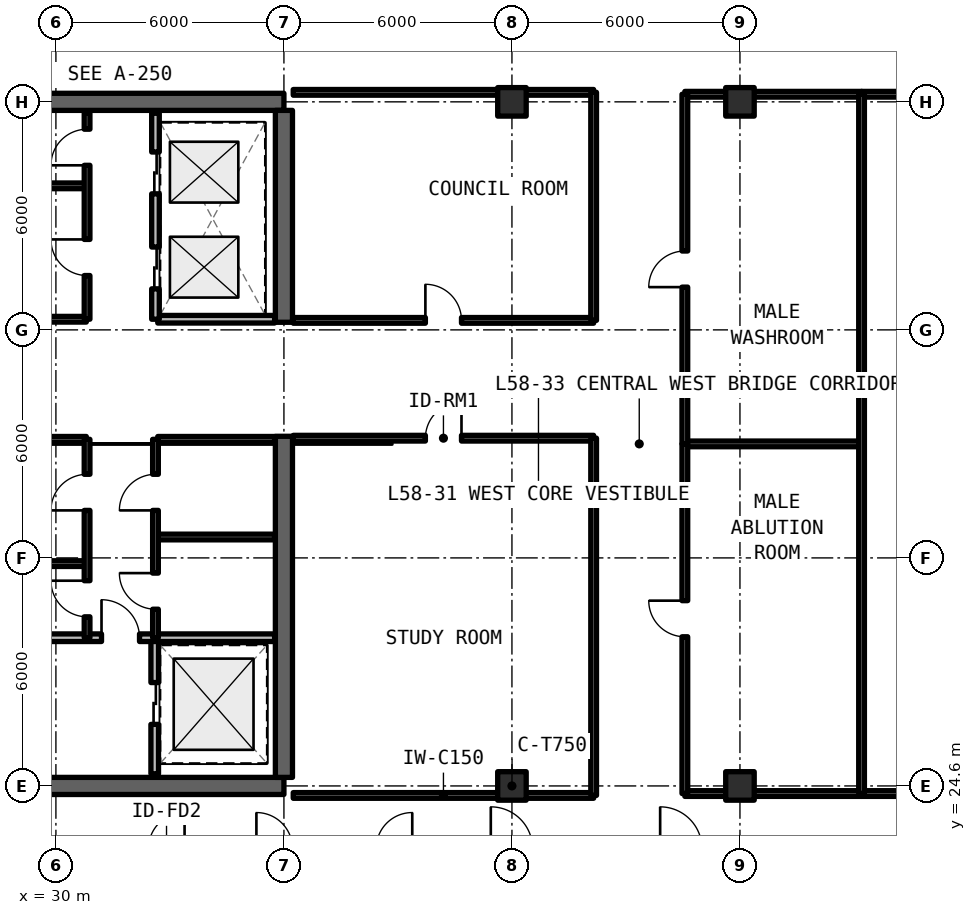
"""IFC4 building model, lengths in metres.
Left out: names, types, materials, properties, quantities, classifications, styles, units other than length and angle.
Written with IfcOpenShell. Run it as: python <this file> out.ifc"""

import sys

from ifc_helpers import new_model, si_unit, direction, frame, frame_2d, origin, origin_2d, place, context, subcontext, project, spatial, rectangle, extrude, element, fill, save


model = new_model("IFC4")
c1 = context("Model", 3, precision=1e-05, world=origin(), true_north=direction((0.0, 1.0)))
c2 = subcontext(c1, "Body", "Model", "MODEL_VIEW")
j1 = project(units=[si_unit("LENGTHUNIT", "METRE"), si_unit("PLANEANGLEUNIT", "RADIAN")], contexts=[c1])
p1 = place(None, origin())
s1 = spatial("IfcSite", under=j1, at=p1, CompositionType="ELEMENT")
p2 = place(p1, origin())
s2 = spatial("IfcBuilding", under=s1, at=p2, CompositionType="ELEMENT")
p3 = place(p2, frame((0.0, 0.0, 208.23)))
s3 = spatial("IfcBuildingStorey", under=s2, at=p3, CompositionType="ELEMENT", Elevation=208.23)
for number, where, z_axis, x_axis in (
    (1, (24.0, 24.6, 0.0), (0.0, 0.0, 1.0), (1.0, 0.0, 0.0)),
    (2, (36.0, 42.6, 0.0), (0.0, 0.0, 1.0), (-1.0, 0.0, 0.0)),
):
    element("IfcWall", number, at=place(p3, frame(where, z_axis=z_axis, x_axis=x_axis)), inside=s3, PredefinedType="SHEAR", context=c2, shape_type="SweptSolid", body=[
        extrude(rectangle(XDim=12.0, YDim=0.45, at=frame_2d((6.0, 0.0))), origin(), (0.0, 0.0, 1.0), 3.63),
    ])
p4 = place(p3, frame((36.0, 24.825, 0.0), z_axis=(0.0, 0.0, 1.0), x_axis=(0.0, 1.0, 0.0)))
e3 = element("IfcWall", 3, at=p4, inside=s3, PredefinedType="SHEAR", context=c2, shape_type="SweptSolid", body=[
    extrude(rectangle(XDim=8.975, YDim=0.45, at=frame_2d((4.488, 0.0))), origin(), (0.0, 0.0, 1.0), 3.63),
])
p5 = place(p3, frame((36.0, 36.8, 0.0), z_axis=(0.0, 0.0, 1.0), x_axis=(0.0, 1.0, 0.0)))
e4 = element("IfcWall", 4, at=p5, inside=s3, PredefinedType="SHEAR", context=c2, shape_type="SweptSolid", body=[
    extrude(rectangle(XDim=5.575, YDim=0.45, at=frame_2d((2.788, 0.0))), origin(), (0.0, 0.0, 1.0), 3.63),
])
for number, where, z_axis, x_axis in (
    (5, (42.0, 24.6, 0.0), (0.0, 0.0, 1.0), (1.0, 0.0, 0.0)),
    (6, (42.0, 42.6, 0.0), (0.0, 0.0, 1.0), (1.0, 0.0, 0.0)),
    (7, (48.0, 24.6, 0.0), (0.0, 0.0, 1.0), (1.0, 0.0, 0.0)),
    (8, (48.0, 42.6, 0.0), (0.0, 0.0, 1.0), (1.0, 0.0, 0.0)),
):
    element("IfcColumn", number, at=place(p3, frame(where, z_axis=z_axis, x_axis=x_axis)), inside=s3, PredefinedType="COLUMN", context=c2, shape_type="SweptSolid", body=[
        extrude(rectangle(XDim=0.75, YDim=0.75, at=origin_2d()), origin(), (0.0, 0.0, 1.0), 3.63),
    ])
p6 = place(p3, frame((32.6, 24.92, 0.0), z_axis=(0.0, 0.0, 1.0), x_axis=(0.0, 1.0, 0.0)))
e9 = element("IfcWall", 9, at=p6, inside=s3, PredefinedType="SOLIDWALL", context=c2, shape_type="SweptSolid", body=[
    extrude(rectangle(XDim=3.58, YDim=0.2, at=frame_2d((1.79, 0.0))), origin(), (0.0, 0.0, 1.0), 2.63),
])
p7 = place(p6, frame((1.3, 0.0, 0.0)))
e10 = element("IfcOpeningElement", 10, at=p7, cuts=e9, PredefinedType="OPENING", context=c2, shape_type="SweptSolid", body=[
    extrude(rectangle(XDim=1.1, YDim=2.2, at=frame_2d((0.55, 1.1))), frame((0.0, 0.11, 0.0), z_axis=(0.0, -1.0, 0.0), x_axis=(1.0, 0.0, 0.0)), (0.0, 0.0, 1.0), 0.22),
])
p8 = place(p3, frame((28.17, 28.5, 0.0), z_axis=(0.0, 0.0, 1.0), x_axis=(1.0, 0.0, 0.0)))
e11 = element("IfcWall", 11, at=p8, inside=s3, PredefinedType="SOLIDWALL", context=c2, shape_type="SweptSolid", body=[
    extrude(rectangle(XDim=7.585, YDim=0.2, at=frame_2d((3.792, 0.0))), origin(), (0.0, 0.0, 1.0), 2.63),
])
p9 = place(p8, frame((3.03, 0.0, 0.0)))
e12 = element("IfcOpeningElement", 12, at=p9, cuts=e11, PredefinedType="OPENING", context=c2, shape_type="SweptSolid", body=[
    extrude(rectangle(XDim=1.0, YDim=2.15, at=frame_2d((0.5, 1.075))), frame((0.0, 0.11, 0.0), z_axis=(0.0, -1.0, 0.0), x_axis=(1.0, 0.0, 0.0)), (0.0, 0.0, 1.0), 0.22),
])
for number, where, z_axis, x_axis in (
    (13, (28.17, 30.45, 0.0), (0.0, 0.0, 1.0), (1.0, 0.0, 0.0)),
    (14, (28.17, 33.72, 0.0), (0.0, 0.0, 1.0), (1.0, 0.0, 0.0)),
):
    element("IfcWall", number, at=place(p3, frame(where, z_axis=z_axis, x_axis=x_axis)), inside=s3, PredefinedType="SOLIDWALL", context=c2, shape_type="SweptSolid", body=[
        extrude(rectangle(XDim=2.63, YDim=0.15, at=frame_2d((1.315, 0.0))), origin(), (0.0, 0.0, 1.0), 2.63),
    ])
p10 = place(p3, frame((30.82, 28.5, 0.0), z_axis=(0.0, 0.0, 1.0), x_axis=(0.0, 1.0, 0.0)))
e15 = element("IfcWall", 15, at=p10, inside=s3, PredefinedType="SOLIDWALL", context=c2, shape_type="SweptSolid", body=[
    extrude(rectangle(XDim=5.22, YDim=0.15, at=frame_2d((2.61, 0.0))), origin(), (0.0, 0.0, 1.0), 2.63),
])
p11 = place(p10, frame((0.55, 0.0, 0.0)))
e16 = element("IfcOpeningElement", 16, at=p11, cuts=e15, PredefinedType="OPENING", context=c2, shape_type="SweptSolid", body=[
    extrude(rectangle(XDim=0.95, YDim=2.15, at=frame_2d((0.475, 1.075))), frame((0.0, 0.085, 0.0), z_axis=(0.0, -1.0, 0.0), x_axis=(1.0, 0.0, 0.0)), (0.0, 0.0, 1.0), 0.17),
])
p12 = place(p10, frame((3.35, 0.0, 0.0)))
e17 = element("IfcOpeningElement", 17, at=p12, cuts=e15, PredefinedType="OPENING", context=c2, shape_type="SweptSolid", body=[
    extrude(rectangle(XDim=0.95, YDim=2.15, at=frame_2d((0.475, 1.075))), frame((0.0, 0.085, 0.0), z_axis=(0.0, -1.0, 0.0), x_axis=(1.0, 0.0, 0.0)), (0.0, 0.0, 1.0), 0.17),
])
for number, where, z_axis, x_axis in (
    (18, (32.68, 31.15, 0.0), (0.0, 0.0, 1.0), (1.0, 0.0, 0.0)),
    (19, (32.68, 33.72, 0.0), (0.0, 0.0, 1.0), (1.0, 0.0, 0.0)),
):
    element("IfcWall", number, at=place(p3, frame(where, z_axis=z_axis, x_axis=x_axis)), inside=s3, PredefinedType="SOLIDWALL", context=c2, shape_type="SweptSolid", body=[
        extrude(rectangle(XDim=3.075, YDim=0.15, at=frame_2d((1.538, 0.0))), origin(), (0.0, 0.0, 1.0), 2.63),
    ])
p13 = place(p3, frame((32.62, 28.5, 0.0), z_axis=(0.0, 0.0, 1.0), x_axis=(0.0, 1.0, 0.0)))
e20 = element("IfcWall", 20, at=p13, inside=s3, PredefinedType="SOLIDWALL", context=c2, shape_type="SweptSolid", body=[
    extrude(rectangle(XDim=5.22, YDim=0.15, at=frame_2d((2.61, 0.0))), origin(), (0.0, 0.0, 1.0), 2.63),
])
p14 = place(p13, frame((0.75, 0.0, 0.0)))
e21 = element("IfcOpeningElement", 21, at=p14, cuts=e20, PredefinedType="OPENING", context=c2, shape_type="SweptSolid", body=[
    extrude(rectangle(XDim=0.95, YDim=2.15, at=frame_2d((0.475, 1.075))), frame((0.0, 0.085, 0.0), z_axis=(0.0, -1.0, 0.0), x_axis=(1.0, 0.0, 0.0)), (0.0, 0.0, 1.0), 0.17),
])
p15 = place(p13, frame((3.35, 0.0, 0.0)))
e22 = element("IfcOpeningElement", 22, at=p15, cuts=e20, PredefinedType="OPENING", context=c2, shape_type="SweptSolid", body=[
    extrude(rectangle(XDim=0.95, YDim=2.15, at=frame_2d((0.475, 1.075))), frame((0.0, 0.085, 0.0), z_axis=(0.0, -1.0, 0.0), x_axis=(1.0, 0.0, 0.0)), (0.0, 0.0, 1.0), 0.17),
])
for number, where, z_axis, x_axis in (
    (23, (28.17, 36.88, 0.0), (0.0, 0.0, 1.0), (1.0, 0.0, 0.0)),
    (24, (28.17, 40.39, 0.0), (0.0, 0.0, 1.0), (1.0, 0.0, 0.0)),
):
    element("IfcWall", number, at=place(p3, frame(where, z_axis=z_axis, x_axis=x_axis)), inside=s3, PredefinedType="SOLIDWALL", context=c2, shape_type="SweptSolid", body=[
        extrude(rectangle(XDim=2.63, YDim=0.15, at=frame_2d((1.315, 0.0))), origin(), (0.0, 0.0, 1.0), 2.63),
    ])
p16 = place(p3, frame((30.82, 36.88, 0.0), z_axis=(0.0, 0.0, 1.0), x_axis=(0.0, 1.0, 0.0)))
e25 = element("IfcWall", 25, at=p16, inside=s3, PredefinedType="SOLIDWALL", context=c2, shape_type="SweptSolid", body=[
    extrude(rectangle(XDim=5.42, YDim=0.15, at=frame_2d((2.71, 0.0))), origin(), (0.0, 0.0, 1.0), 2.63),
])
p17 = place(p16, frame((1.15, 0.0, 0.0)))
e26 = element("IfcOpeningElement", 26, at=p17, cuts=e25, PredefinedType="OPENING", context=c2, shape_type="SweptSolid", body=[
    extrude(rectangle(XDim=0.95, YDim=2.15, at=frame_2d((0.475, 1.075))), frame((0.0, 0.085, 0.0), z_axis=(0.0, -1.0, 0.0), x_axis=(1.0, 0.0, 0.0)), (0.0, 0.0, 1.0), 0.17),
])
p18 = place(p16, frame((4.05, 0.0, 0.0)))
e27 = element("IfcOpeningElement", 27, at=p18, cuts=e25, PredefinedType="OPENING", context=c2, shape_type="SweptSolid", body=[
    extrude(rectangle(XDim=0.95, YDim=2.15, at=frame_2d((0.475, 1.075))), frame((0.0, 0.085, 0.0), z_axis=(0.0, -1.0, 0.0), x_axis=(1.0, 0.0, 0.0)), (0.0, 0.0, 1.0), 0.17),
])
p19 = place(p3, frame((32.68, 36.88, 0.0), z_axis=(0.0, 0.0, 1.0), x_axis=(1.0, 0.0, 0.0)))
e28 = element("IfcWall", 28, at=p19, inside=s3, PredefinedType="SOLIDWALL", context=c2, shape_type="SweptSolid", body=[
    extrude(rectangle(XDim=3.075, YDim=0.2, at=frame_2d((1.538, 0.0))), origin(), (0.0, 0.0, 1.0), 2.63),
])
p20 = place(p3, frame((32.62, 36.88, 0.0), z_axis=(0.0, 0.0, 1.0), x_axis=(0.0, 1.0, 0.0)))
e29 = element("IfcWall", 29, at=p20, inside=s3, PredefinedType="SOLIDWALL", context=c2, shape_type="SweptSolid", body=[
    extrude(rectangle(XDim=5.42, YDim=0.2, at=frame_2d((2.71, 0.0))), origin(), (0.0, 0.0, 1.0), 2.63),
])
p21 = place(p20, frame((0.8, 0.0, 0.0)))
e30 = element("IfcOpeningElement", 30, at=p21, cuts=e29, PredefinedType="OPENING", context=c2, shape_type="SweptSolid", body=[
    extrude(rectangle(XDim=1.1, YDim=2.2, at=frame_2d((0.55, 1.1))), frame((0.0, 0.11, 0.0), z_axis=(0.0, -1.0, 0.0), x_axis=(1.0, 0.0, 0.0)), (0.0, 0.0, 1.0), 0.22),
])
p22 = place(p20, frame((3.3, 0.0, 0.0)))
e31 = element("IfcOpeningElement", 31, at=p22, cuts=e29, PredefinedType="OPENING", context=c2, shape_type="SweptSolid", body=[
    extrude(rectangle(XDim=1.1, YDim=2.2, at=frame_2d((0.55, 1.1))), frame((0.0, 0.11, 0.0), z_axis=(0.0, -1.0, 0.0), x_axis=(1.0, 0.0, 0.0)), (0.0, 0.0, 1.0), 0.22),
])
p23 = place(p3, frame((36.245, 24.35, 0.0), z_axis=(0.0, 0.0, 1.0), x_axis=(1.0, 0.0, 0.0)))
e32 = element("IfcWall", 32, at=p23, inside=s3, PredefinedType="SOLIDWALL", context=c2, shape_type="SweptSolid", body=[
    extrude(rectangle(XDim=7.905, YDim=0.15, at=frame_2d((3.952, 0.0))), origin(), (0.0, 0.0, 1.0), 2.63),
])
p24 = place(p3, frame((36.245, 33.75, 0.0), z_axis=(0.0, 0.0, 1.0), x_axis=(1.0, 0.0, 0.0)))
e33 = element("IfcWall", 33, at=p24, inside=s3, PredefinedType="SOLIDWALL", context=c2, shape_type="SweptSolid", body=[
    extrude(rectangle(XDim=7.905, YDim=0.15, at=frame_2d((3.952, 0.0))), origin(), (0.0, 0.0, 1.0), 2.63),
])
p25 = place(p24, frame((3.478, 0.0, 0.0)))
e34 = element("IfcOpeningElement", 34, at=p25, cuts=e33, PredefinedType="OPENING", context=c2, shape_type="SweptSolid", body=[
    extrude(rectangle(XDim=0.95, YDim=2.15, at=frame_2d((0.475, 1.075))), frame((0.0, 0.085, 0.0), z_axis=(0.0, -1.0, 0.0), x_axis=(1.0, 0.0, 0.0)), (0.0, 0.0, 1.0), 0.17),
])
p26 = place(p3, frame((44.15, 24.35, 0.0), z_axis=(0.0, 0.0, 1.0), x_axis=(0.0, 1.0, 0.0)))
e35 = element("IfcWall", 35, at=p26, inside=s3, PredefinedType="SOLIDWALL", context=c2, shape_type="SweptSolid", body=[
    extrude(rectangle(XDim=9.4, YDim=0.15, at=frame_2d((4.7, 0.0))), origin(), (0.0, 0.0, 1.0), 2.63),
])
p27 = place(p3, frame((36.245, 36.85, 0.0), z_axis=(0.0, 0.0, 1.0), x_axis=(1.0, 0.0, 0.0)))
e36 = element("IfcWall", 36, at=p27, inside=s3, PredefinedType="SOLIDWALL", context=c2, shape_type="SweptSolid", body=[
    extrude(rectangle(XDim=7.905, YDim=0.15, at=frame_2d((3.952, 0.0))), origin(), (0.0, 0.0, 1.0), 2.63),
])
p28 = place(p27, frame((3.478, 0.0, 0.0)))
e37 = element("IfcOpeningElement", 37, at=p28, cuts=e36, PredefinedType="OPENING", context=c2, shape_type="SweptSolid", body=[
    extrude(rectangle(XDim=0.95, YDim=2.15, at=frame_2d((0.475, 1.075))), frame((0.0, 0.085, 0.0), z_axis=(0.0, -1.0, 0.0), x_axis=(1.0, 0.0, 0.0)), (0.0, 0.0, 1.0), 0.17),
])
p29 = place(p3, frame((36.245, 42.85, 0.0), z_axis=(0.0, 0.0, 1.0), x_axis=(1.0, 0.0, 0.0)))
e38 = element("IfcWall", 38, at=p29, inside=s3, PredefinedType="SOLIDWALL", context=c2, shape_type="SweptSolid", body=[
    extrude(rectangle(XDim=7.905, YDim=0.15, at=frame_2d((3.952, 0.0))), origin(), (0.0, 0.0, 1.0), 2.63),
])
p30 = place(p3, frame((44.15, 36.85, 0.0), z_axis=(0.0, 0.0, 1.0), x_axis=(0.0, 1.0, 0.0)))
e39 = element("IfcWall", 39, at=p30, inside=s3, PredefinedType="SOLIDWALL", context=c2, shape_type="SweptSolid", body=[
    extrude(rectangle(XDim=6.0, YDim=0.15, at=frame_2d((3.0, 0.0))), origin(), (0.0, 0.0, 1.0), 2.63),
])
for number, where, z_axis, x_axis in (
    (40, (46.55, 24.4, 0.0), (0.0, 0.0, 1.0), (1.0, 0.0, 0.0)),
    (41, (46.55, 33.6, 0.0), (0.0, 0.0, 1.0), (1.0, 0.0, 0.0)),
):
    element("IfcWall", number, at=place(p3, frame(where, z_axis=z_axis, x_axis=x_axis)), inside=s3, PredefinedType="SOLIDWALL", context=c2, shape_type="SweptSolid", body=[
        extrude(rectangle(XDim=4.65, YDim=0.15, at=frame_2d((2.325, 0.0))), origin(), (0.0, 0.0, 1.0), 2.63),
    ])
p31 = place(p3, frame((46.55, 24.4, 0.0), z_axis=(0.0, 0.0, 1.0), x_axis=(0.0, 1.0, 0.0)))
e42 = element("IfcWall", 42, at=p31, inside=s3, PredefinedType="SOLIDWALL", context=c2, shape_type="SweptSolid", body=[
    extrude(rectangle(XDim=9.2, YDim=0.15, at=frame_2d((4.6, 0.0))), origin(), (0.0, 0.0, 1.0), 2.63),
])
p32 = place(p31, frame((4.125, 0.0, 0.0)))
e43 = element("IfcOpeningElement", 43, at=p32, cuts=e42, PredefinedType="OPENING", context=c2, shape_type="SweptSolid", body=[
    extrude(rectangle(XDim=0.95, YDim=2.15, at=frame_2d((0.475, 1.075))), frame((0.0, 0.085, 0.0), z_axis=(0.0, -1.0, 0.0), x_axis=(1.0, 0.0, 0.0)), (0.0, 0.0, 1.0), 0.17),
])
p33 = place(p3, frame((46.55, 42.8, 0.0), z_axis=(0.0, 0.0, 1.0), x_axis=(1.0, 0.0, 0.0)))
e44 = element("IfcWall", 44, at=p33, inside=s3, PredefinedType="SOLIDWALL", context=c2, shape_type="SweptSolid", body=[
    extrude(rectangle(XDim=4.65, YDim=0.15, at=frame_2d((2.325, 0.0))), origin(), (0.0, 0.0, 1.0), 2.63),
])
p34 = place(p3, frame((46.55, 33.6, 0.0), z_axis=(0.0, 0.0, 1.0), x_axis=(0.0, 1.0, 0.0)))
e45 = element("IfcWall", 45, at=p34, inside=s3, PredefinedType="SOLIDWALL", context=c2, shape_type="SweptSolid", body=[
    extrude(rectangle(XDim=9.2, YDim=0.15, at=frame_2d((4.6, 0.0))), origin(), (0.0, 0.0, 1.0), 2.63),
])
p35 = place(p34, frame((4.125, 0.0, 0.0)))
e46 = element("IfcOpeningElement", 46, at=p35, cuts=e45, PredefinedType="OPENING", context=c2, shape_type="SweptSolid", body=[
    extrude(rectangle(XDim=0.95, YDim=2.15, at=frame_2d((0.475, 1.075))), frame((0.0, 0.085, 0.0), z_axis=(0.0, -1.0, 0.0), x_axis=(1.0, 0.0, 0.0)), (0.0, 0.0, 1.0), 0.17),
])
p36 = place(p3, frame((51.2, 24.4, 0.0), z_axis=(0.0, 0.0, 1.0), x_axis=(1.0, 0.0, 0.0)))
e47 = element("IfcWall", 47, at=p36, inside=s3, PredefinedType="SOLIDWALL", context=c2, shape_type="SweptSolid", body=[
    extrude(rectangle(XDim=11.6, YDim=0.15, at=frame_2d((5.8, 0.0))), origin(), (0.0, 0.0, 1.0), 2.63),
])
p37 = place(p36, frame((5.1, 0.0, 0.0)))
e48 = element("IfcOpeningElement", 48, at=p37, cuts=e47, PredefinedType="OPENING", context=c2, shape_type="SweptSolid", body=[
    extrude(rectangle(XDim=1.4, YDim=2.15, at=frame_2d((0.7, 1.075))), frame((0.0, 0.085, 0.0), z_axis=(0.0, -1.0, 0.0), x_axis=(1.0, 0.0, 0.0)), (0.0, 0.0, 1.0), 0.17),
])
p38 = place(p3, frame((51.2, 42.8, 0.0), z_axis=(0.0, 0.0, 1.0), x_axis=(1.0, 0.0, 0.0)))
e49 = element("IfcWall", 49, at=p38, inside=s3, PredefinedType="SOLIDWALL", context=c2, shape_type="SweptSolid", body=[
    extrude(rectangle(XDim=11.6, YDim=0.15, at=frame_2d((5.8, 0.0))), origin(), (0.0, 0.0, 1.0), 2.63),
])
p39 = place(p3, frame((51.2, 24.4, 0.0), z_axis=(0.0, 0.0, 1.0), x_axis=(0.0, 1.0, 0.0)))
e50 = element("IfcWall", 50, at=p39, inside=s3, PredefinedType="SOLIDWALL", context=c2, shape_type="SweptSolid", body=[
    extrude(rectangle(XDim=18.4, YDim=0.15, at=frame_2d((9.2, 0.0))), origin(), (0.0, 0.0, 1.0), 2.63),
])
p40 = place(p7, origin())
e51 = element("IfcDoor", 51, at=p40, inside=s3, OperationType="SLIDING_TO_LEFT", PredefinedType="DOOR", context=c2, shape_type="SweptSolid", body=[
    extrude(rectangle(XDim=1.1, YDim=2.2, at=frame_2d((0.55, 1.1))), frame((0.0, 0.025, 0.0), z_axis=(0.0, -1.0, 0.0), x_axis=(1.0, 0.0, 0.0)), (0.0, 0.0, 1.0), 0.05),
])
fill(e10, e51)
p41 = place(p9, origin())
e52 = element("IfcDoor", 52, at=p41, inside=s3, OperationType="SINGLE_SWING_LEFT", PredefinedType="DOOR", context=c2, shape_type="SweptSolid", body=[
    extrude(rectangle(XDim=1.0, YDim=2.15, at=frame_2d((0.5, 1.075))), frame((0.0, 0.025, 0.0), z_axis=(0.0, -1.0, 0.0), x_axis=(1.0, 0.0, 0.0)), (0.0, 0.0, 1.0), 0.05),
])
fill(e12, e52)
p42 = place(p11, origin())
e53 = element("IfcDoor", 53, at=p42, inside=s3, OperationType="SINGLE_SWING_RIGHT", PredefinedType="DOOR", context=c2, shape_type="SweptSolid", body=[
    extrude(rectangle(XDim=0.95, YDim=2.15, at=frame_2d((0.475, 1.075))), frame((0.0, 0.025, 0.0), z_axis=(0.0, -1.0, 0.0), x_axis=(1.0, 0.0, 0.0)), (0.0, 0.0, 1.0), 0.05),
])
fill(e16, e53)
p43 = place(p12, origin())
e54 = element("IfcDoor", 54, at=p43, inside=s3, OperationType="SINGLE_SWING_LEFT", PredefinedType="DOOR", context=c2, shape_type="SweptSolid", body=[
    extrude(rectangle(XDim=0.95, YDim=2.15, at=frame_2d((0.475, 1.075))), frame((0.0, 0.025, 0.0), z_axis=(0.0, -1.0, 0.0), x_axis=(1.0, 0.0, 0.0)), (0.0, 0.0, 1.0), 0.05),
])
fill(e17, e54)
p44 = place(p14, origin())
e55 = element("IfcDoor", 55, at=p44, inside=s3, OperationType="SINGLE_SWING_RIGHT", PredefinedType="DOOR", context=c2, shape_type="SweptSolid", body=[
    extrude(rectangle(XDim=0.95, YDim=2.15, at=frame_2d((0.475, 1.075))), frame((0.0, 0.025, 0.0), z_axis=(0.0, -1.0, 0.0), x_axis=(1.0, 0.0, 0.0)), (0.0, 0.0, 1.0), 0.05),
])
fill(e21, e55)
p45 = place(p15, origin())
e56 = element("IfcDoor", 56, at=p45, inside=s3, OperationType="SINGLE_SWING_LEFT", PredefinedType="DOOR", context=c2, shape_type="SweptSolid", body=[
    extrude(rectangle(XDim=0.95, YDim=2.15, at=frame_2d((0.475, 1.075))), frame((0.0, 0.025, 0.0), z_axis=(0.0, -1.0, 0.0), x_axis=(1.0, 0.0, 0.0)), (0.0, 0.0, 1.0), 0.05),
])
fill(e22, e56)
p46 = place(p17, origin())
e57 = element("IfcDoor", 57, at=p46, inside=s3, OperationType="SINGLE_SWING_RIGHT", PredefinedType="DOOR", context=c2, shape_type="SweptSolid", body=[
    extrude(rectangle(XDim=0.95, YDim=2.15, at=frame_2d((0.475, 1.075))), frame((0.0, 0.025, 0.0), z_axis=(0.0, -1.0, 0.0), x_axis=(1.0, 0.0, 0.0)), (0.0, 0.0, 1.0), 0.05),
])
fill(e26, e57)
p47 = place(p18, origin())
e58 = element("IfcDoor", 58, at=p47, inside=s3, OperationType="SINGLE_SWING_LEFT", PredefinedType="DOOR", context=c2, shape_type="SweptSolid", body=[
    extrude(rectangle(XDim=0.95, YDim=2.15, at=frame_2d((0.475, 1.075))), frame((0.0, 0.025, 0.0), z_axis=(0.0, -1.0, 0.0), x_axis=(1.0, 0.0, 0.0)), (0.0, 0.0, 1.0), 0.05),
])
fill(e27, e58)
p48 = place(p21, origin())
e59 = element("IfcDoor", 59, at=p48, inside=s3, OperationType="SLIDING_TO_LEFT", PredefinedType="DOOR", context=c2, shape_type="SweptSolid", body=[
    extrude(rectangle(XDim=1.1, YDim=2.2, at=frame_2d((0.55, 1.1))), frame((0.0, 0.025, 0.0), z_axis=(0.0, -1.0, 0.0), x_axis=(1.0, 0.0, 0.0)), (0.0, 0.0, 1.0), 0.05),
])
fill(e30, e59)
p49 = place(p22, origin())
e60 = element("IfcDoor", 60, at=p49, inside=s3, OperationType="SLIDING_TO_RIGHT", PredefinedType="DOOR", context=c2, shape_type="SweptSolid", body=[
    extrude(rectangle(XDim=1.1, YDim=2.2, at=frame_2d((0.55, 1.1))), frame((0.0, 0.025, 0.0), z_axis=(0.0, -1.0, 0.0), x_axis=(1.0, 0.0, 0.0)), (0.0, 0.0, 1.0), 0.05),
])
fill(e31, e60)
p50 = place(p25, origin())
e61 = element("IfcDoor", 61, at=p50, inside=s3, OperationType="SINGLE_SWING_RIGHT", PredefinedType="DOOR", context=c2, shape_type="SweptSolid", body=[
    extrude(rectangle(XDim=0.95, YDim=2.15, at=frame_2d((0.475, 1.075))), frame((0.0, 0.025, 0.0), z_axis=(0.0, -1.0, 0.0), x_axis=(1.0, 0.0, 0.0)), (0.0, 0.0, 1.0), 0.05),
])
fill(e34, e61)
p51 = place(p28, origin())
e62 = element("IfcDoor", 62, at=p51, inside=s3, OperationType="SINGLE_SWING_LEFT", PredefinedType="DOOR", context=c2, shape_type="SweptSolid", body=[
    extrude(rectangle(XDim=0.95, YDim=2.15, at=frame_2d((0.475, 1.075))), frame((0.0, 0.025, 0.0), z_axis=(0.0, -1.0, 0.0), x_axis=(1.0, 0.0, 0.0)), (0.0, 0.0, 1.0), 0.05),
])
fill(e37, e62)
p52 = place(p32, origin())
e63 = element("IfcDoor", 63, at=p52, inside=s3, OperationType="SINGLE_SWING_RIGHT", PredefinedType="DOOR", context=c2, shape_type="SweptSolid", body=[
    extrude(rectangle(XDim=0.95, YDim=2.15, at=frame_2d((0.475, 1.075))), frame((0.0, 0.025, 0.0), z_axis=(0.0, -1.0, 0.0), x_axis=(1.0, 0.0, 0.0)), (0.0, 0.0, 1.0), 0.05),
])
fill(e43, e63)
p53 = place(p35, origin())
e64 = element("IfcDoor", 64, at=p53, inside=s3, OperationType="SINGLE_SWING_LEFT", PredefinedType="DOOR", context=c2, shape_type="SweptSolid", body=[
    extrude(rectangle(XDim=0.95, YDim=2.15, at=frame_2d((0.475, 1.075))), frame((0.0, 0.025, 0.0), z_axis=(0.0, -1.0, 0.0), x_axis=(1.0, 0.0, 0.0)), (0.0, 0.0, 1.0), 0.05),
])
fill(e46, e64)
save(model, sys.argv[1])
